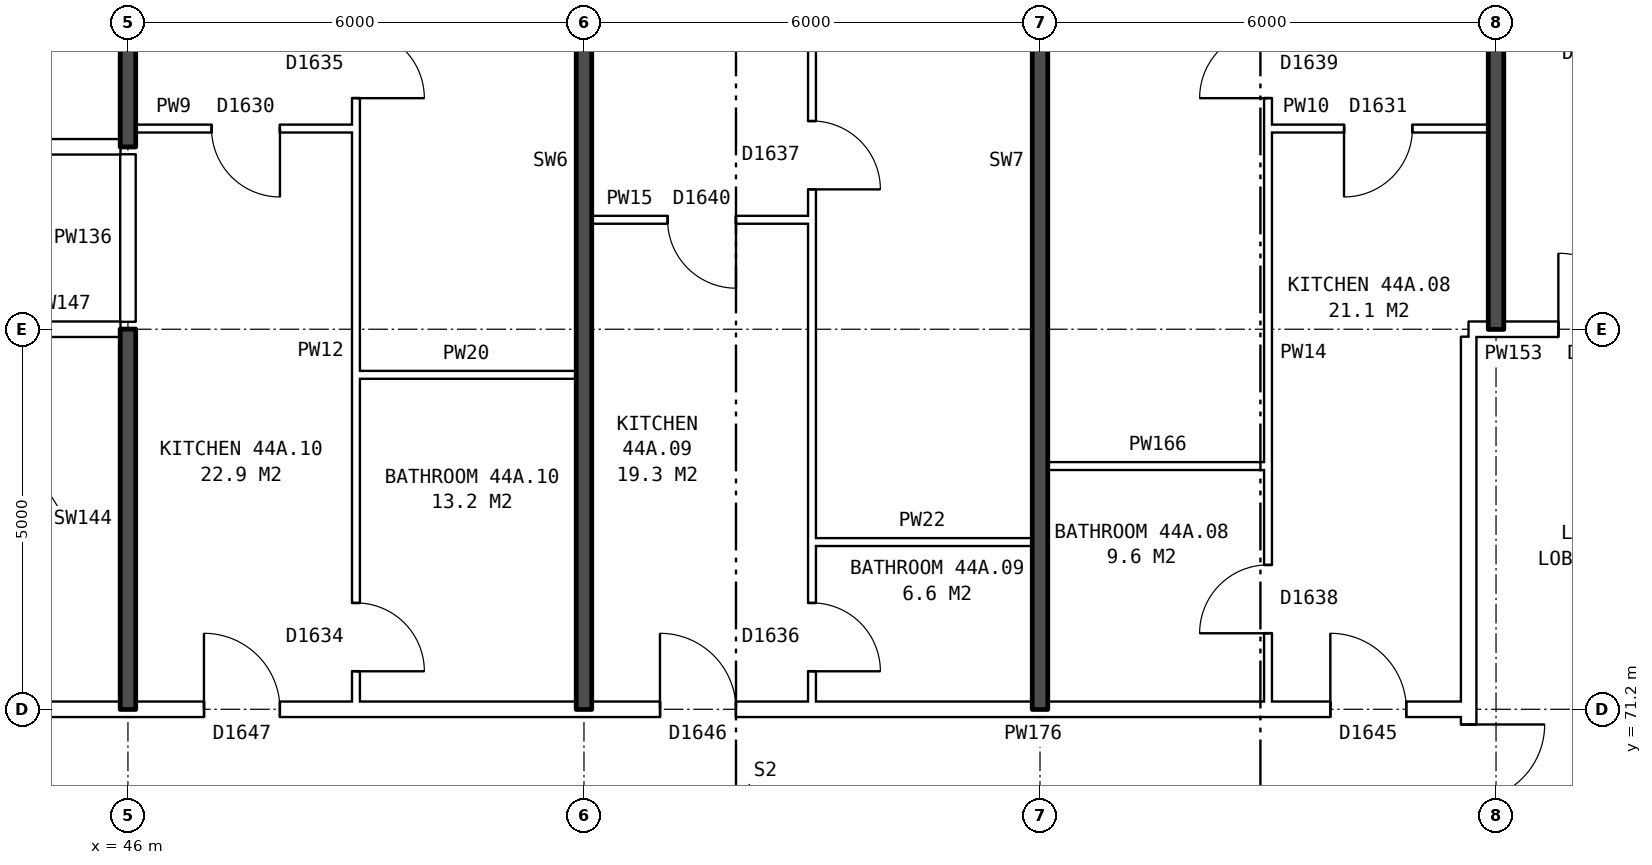
"""IFC4 building model, lengths in metres.
Left out: names, types, materials, properties, quantities, classifications, styles, units other than length and angle.
Written with IfcOpenShell. Run it as: python <this file> out.ifc"""

import sys

from ifc_helpers import new_model, si_unit, direction, frame, frame_2d, origin, place, context, subcontext, project, spatial, rectangle, extrude, element, fill, save


model = new_model("IFC4")
c1 = context("Model", 3, precision=1e-05, world=origin(), true_north=direction((0.0, 1.0)))
c2 = subcontext(c1, "Body", "Model", "MODEL_VIEW")
j1 = project(units=[si_unit("LENGTHUNIT", "METRE"), si_unit("PLANEANGLEUNIT", "RADIAN")], contexts=[c1])
p1 = place(None, origin())
s1 = spatial("IfcSite", under=j1, at=p1, CompositionType="ELEMENT")
p2 = place(p1, origin())
s2 = spatial("IfcBuilding", under=s1, at=p2, CompositionType="ELEMENT")
p3 = place(p2, frame((0.0, 0.0, 157.8)))
s3 = spatial("IfcBuildingStorey", under=s2, at=p3, CompositionType="ELEMENT", Elevation=157.8)
p4 = place(p3, frame((63.64, 63.9, 0.0), z_axis=(0.0, 0.0, 1.0), x_axis=(0.0, 1.0, 0.0)))
e1 = element("IfcWall", 1, at=p4, inside=s3, PredefinedType="PARTITIONING", context=c2, shape_type="SweptSolid", body=[
    extrude(rectangle(XDim=12.2, YDim=0.2, at=frame_2d((6.1, 0.0))), origin(), (0.0, 0.0, 1.0), 2.85),
])
p5 = place(p4, frame((5.1, 0.0, 0.0)))
e2 = element("IfcOpeningElement", 2, at=p5, cuts=e1, PredefinedType="OPENING", context=c2, shape_type="SweptSolid", body=[
    extrude(rectangle(XDim=2.0, YDim=2.1, at=frame_2d((1.0, 1.05))), frame((0.0, 0.11, 0.0), z_axis=(0.0, -1.0, 0.0), x_axis=(1.0, 0.0, 0.0)), (0.0, 0.0, 1.0), 0.22),
])
p6 = place(p3, frame((44.36, 71.2, 0.0), z_axis=(0.0, 0.0, 1.0), x_axis=(1.0, 0.0, 0.0)))
e3 = element("IfcWall", 3, at=p6, inside=s3, PredefinedType="PARTITIONING", context=c2, shape_type="SweptSolid", body=[
    extrude(rectangle(XDim=19.28, YDim=0.2, at=frame_2d((9.64, 0.0))), origin(), (0.0, 0.0, 1.0), 2.85),
])
p7 = place(p6, frame((17.46, 0.0, 0.0)))
e4 = element("IfcOpeningElement", 4, at=p7, cuts=e3, PredefinedType="OPENING", context=c2, shape_type="SweptSolid", body=[
    extrude(rectangle(XDim=1.0, YDim=2.1, at=frame_2d((0.5, 1.05))), frame((0.0, 0.11, 0.0), z_axis=(0.0, -1.0, 0.0), x_axis=(1.0, 0.0, 0.0)), (0.0, 0.0, 1.0), 0.22),
])
p8 = place(p6, frame((8.64, 0.0, 0.0)))
e5 = element("IfcOpeningElement", 5, at=p8, cuts=e3, PredefinedType="OPENING", context=c2, shape_type="SweptSolid", body=[
    extrude(rectangle(XDim=1.0, YDim=2.1, at=frame_2d((0.5, 1.05))), frame((0.0, 0.11, 0.0), z_axis=(0.0, -1.0, 0.0), x_axis=(1.0, 0.0, 0.0)), (0.0, 0.0, 1.0), 0.22),
])
p9 = place(p6, frame((2.64, 0.0, 0.0)))
e6 = element("IfcOpeningElement", 6, at=p9, cuts=e3, PredefinedType="OPENING", context=c2, shape_type="SweptSolid", body=[
    extrude(rectangle(XDim=1.0, YDim=2.1, at=frame_2d((0.5, 1.05))), frame((0.0, 0.11, 0.0), z_axis=(0.0, -1.0, 0.0), x_axis=(1.0, 0.0, 0.0)), (0.0, 0.0, 1.0), 0.22),
])
for number, where, z_axis, x_axis in (
    (7, (55.0, 73.4, 0.0), (0.0, 0.0, 1.0), (1.0, 0.0, 0.0)),
    (8, (58.1, 74.4, 0.0), (0.0, 0.0, 1.0), (1.0, 0.0, 0.0)),
    (9, (49.0, 75.6, 0.0), (0.0, 0.0, 1.0), (1.0, 0.0, 0.0)),
):
    element("IfcWall", number, at=place(p3, frame(where, z_axis=z_axis, x_axis=x_axis)), inside=s3, PredefinedType="PARTITIONING", context=c2, shape_type="SweptSolid", body=[
        extrude(rectangle(XDim=2.9, YDim=0.1, at=frame_2d((1.45, 0.0))), origin(), (0.0, 0.0, 1.0), 2.85),
    ])
p10 = place(p3, frame((44.36, 76.2, 0.0), z_axis=(0.0, 0.0, 1.0), x_axis=(1.0, 0.0, 0.0)))
e10 = element("IfcWall", 10, at=p10, inside=s3, PredefinedType="PARTITIONING", context=c2, shape_type="SweptSolid", body=[
    extrude(rectangle(XDim=1.54, YDim=0.2, at=frame_2d((0.77, 0.0))), origin(), (0.0, 0.0, 1.0), 2.85),
])
p11 = place(p3, frame((63.64, 76.2, 0.0), z_axis=(0.0, 0.0, 1.0), x_axis=(1.0, 0.0, 0.0)))
e11 = element("IfcWall", 11, at=p11, inside=s3, PredefinedType="PARTITIONING", context=c2, shape_type="SweptSolid", body=[
    extrude(rectangle(XDim=3.0, YDim=0.2, at=frame_2d((1.5, 0.0))), origin(), (0.0, 0.0, 1.0), 2.85),
])
p12 = place(p11, frame((1.18, 0.0, 0.0)))
e12 = element("IfcOpeningElement", 12, at=p12, cuts=e11, PredefinedType="OPENING", context=c2, shape_type="SweptSolid", body=[
    extrude(rectangle(XDim=1.0, YDim=2.1, at=frame_2d((0.5, 1.05))), frame((0.0, 0.11, 0.0), z_axis=(0.0, -1.0, 0.0), x_axis=(1.0, 0.0, 0.0)), (0.0, 0.0, 1.0), 0.22),
])
p13 = place(p3, frame((52.1, 77.64, 0.0), z_axis=(0.0, 0.0, 1.0), x_axis=(1.0, 0.0, 0.0)))
e13 = element("IfcWall", 13, at=p13, inside=s3, PredefinedType="PARTITIONING", context=c2, shape_type="SweptSolid", body=[
    extrude(rectangle(XDim=2.9, YDim=0.1, at=frame_2d((1.45, 0.0))), origin(), (0.0, 0.0, 1.0), 2.85),
])
p14 = place(p13, frame((1.0, 0.0, 0.0)))
e14 = element("IfcOpeningElement", 14, at=p14, cuts=e13, PredefinedType="OPENING", context=c2, shape_type="SweptSolid", body=[
    extrude(rectangle(XDim=0.9, YDim=2.1, at=frame_2d((0.45, 1.05))), frame((0.0, 0.06, 0.0), z_axis=(0.0, -1.0, 0.0), x_axis=(1.0, 0.0, 0.0)), (0.0, 0.0, 1.0), 0.12),
])
p15 = place(p3, frame((28.86, 78.6, 0.0), z_axis=(0.0, 0.0, 1.0), x_axis=(1.0, 0.0, 0.0)))
e15 = element("IfcWall", 15, at=p15, inside=s3, PredefinedType="PARTITIONING", context=c2, shape_type="SweptSolid", body=[
    extrude(rectangle(XDim=17.04, YDim=0.2, at=frame_2d((8.52, 0.0))), origin(), (0.0, 0.0, 1.0), 2.85),
])
p16 = place(p15, frame((14.59, 0.0, 0.0)))
e16 = element("IfcOpeningElement", 16, at=p16, cuts=e15, PredefinedType="OPENING", context=c2, shape_type="SweptSolid", body=[
    extrude(rectangle(XDim=1.0, YDim=2.1, at=frame_2d((0.5, 1.05))), frame((0.0, 0.11, 0.0), z_axis=(0.0, -1.0, 0.0), x_axis=(1.0, 0.0, 0.0)), (0.0, 0.0, 1.0), 0.22),
])
p17 = place(p15, frame((7.64, 0.0, 0.0)))
e17 = element("IfcOpeningElement", 17, at=p17, cuts=e15, PredefinedType="OPENING", context=c2, shape_type="SweptSolid", body=[
    extrude(rectangle(XDim=1.0, YDim=2.1, at=frame_2d((0.5, 1.05))), frame((0.0, 0.11, 0.0), z_axis=(0.0, -1.0, 0.0), x_axis=(1.0, 0.0, 0.0)), (0.0, 0.0, 1.0), 0.22),
])
p18 = place(p3, frame((46.1, 78.84, 0.0), z_axis=(0.0, 0.0, 1.0), x_axis=(1.0, 0.0, 0.0)))
e18 = element("IfcWall", 18, at=p18, inside=s3, PredefinedType="PARTITIONING", context=c2, shape_type="SweptSolid", body=[
    extrude(rectangle(XDim=2.9, YDim=0.1, at=frame_2d((1.45, 0.0))), origin(), (0.0, 0.0, 1.0), 2.85),
])
p19 = place(p18, frame((1.0, 0.0, 0.0)))
e19 = element("IfcOpeningElement", 19, at=p19, cuts=e18, PredefinedType="OPENING", context=c2, shape_type="SweptSolid", body=[
    extrude(rectangle(XDim=0.9, YDim=2.1, at=frame_2d((0.45, 1.05))), frame((0.0, 0.06, 0.0), z_axis=(0.0, -1.0, 0.0), x_axis=(1.0, 0.0, 0.0)), (0.0, 0.0, 1.0), 0.12),
])
p20 = place(p3, frame((61.0, 78.84, 0.0), z_axis=(0.0, 0.0, 1.0), x_axis=(1.0, 0.0, 0.0)))
e20 = element("IfcWall", 20, at=p20, inside=s3, PredefinedType="PARTITIONING", context=c2, shape_type="SweptSolid", body=[
    extrude(rectangle(XDim=2.9, YDim=0.1, at=frame_2d((1.45, 0.0))), origin(), (0.0, 0.0, 1.0), 2.85),
])
p21 = place(p20, frame((1.0, 0.0, 0.0)))
e21 = element("IfcOpeningElement", 21, at=p21, cuts=e20, PredefinedType="OPENING", context=c2, shape_type="SweptSolid", body=[
    extrude(rectangle(XDim=0.9, YDim=2.1, at=frame_2d((0.45, 1.05))), frame((0.0, 0.06, 0.0), z_axis=(0.0, -1.0, 0.0), x_axis=(1.0, 0.0, 0.0)), (0.0, 0.0, 1.0), 0.12),
])
p22 = place(p3, frame((46.0, 71.2, 0.0), z_axis=(0.0, 0.0, 1.0), x_axis=(0.0, 1.0, 0.0)))
e22 = element("IfcWall", 22, at=p22, inside=s3, PredefinedType="SOLIDWALL", context=c2, shape_type="SweptSolid", body=[
    extrude(rectangle(XDim=5.0, YDim=0.2, at=frame_2d((2.5, 0.0))), origin(), (0.0, 0.0, 1.0), 2.85),
])
p23 = place(p3, frame((46.0, 76.3, 0.0), z_axis=(0.0, 0.0, 1.0), x_axis=(0.0, 1.0, 0.0)))
e23 = element("IfcWall", 23, at=p23, inside=s3, PredefinedType="PARTITIONING", context=c2, shape_type="SweptSolid", body=[
    extrude(rectangle(XDim=2.2, YDim=0.2, at=frame_2d((1.1, 0.0))), origin(), (0.0, 0.0, 1.0), 2.85),
])
p24 = place(p3, frame((46.0, 78.6, 0.0), z_axis=(0.0, 0.0, 1.0), x_axis=(0.0, 1.0, 0.0)))
e24 = element("IfcWall", 24, at=p24, inside=s3, PredefinedType="SOLIDWALL", context=c2, shape_type="SweptSolid", body=[
    extrude(rectangle(XDim=7.04, YDim=0.2, at=frame_2d((3.52, 0.0))), origin(), (0.0, 0.0, 1.0), 2.85),
])
p25 = place(p3, frame((49.0, 71.3, 0.0), z_axis=(0.0, 0.0, 1.0), x_axis=(0.0, 1.0, 0.0)))
e25 = element("IfcWall", 25, at=p25, inside=s3, PredefinedType="PARTITIONING", context=c2, shape_type="SweptSolid", body=[
    extrude(rectangle(XDim=14.34, YDim=0.1, at=frame_2d((7.17, 0.0))), origin(), (0.0, 0.0, 1.0), 2.85),
])
p26 = place(p25, frame((7.94, 0.0, 0.0)))
e26 = element("IfcOpeningElement", 26, at=p26, cuts=e25, PredefinedType="OPENING", context=c2, shape_type="SweptSolid", body=[
    extrude(rectangle(XDim=0.9, YDim=2.1, at=frame_2d((0.45, 1.05))), frame((0.0, 0.06, 0.0), z_axis=(0.0, -1.0, 0.0), x_axis=(1.0, 0.0, 0.0)), (0.0, 0.0, 1.0), 0.12),
])
p27 = place(p25, frame((0.4, 0.0, 0.0)))
e27 = element("IfcOpeningElement", 27, at=p27, cuts=e25, PredefinedType="OPENING", context=c2, shape_type="SweptSolid", body=[
    extrude(rectangle(XDim=0.9, YDim=2.1, at=frame_2d((0.45, 1.05))), frame((0.0, 0.06, 0.0), z_axis=(0.0, -1.0, 0.0), x_axis=(1.0, 0.0, 0.0)), (0.0, 0.0, 1.0), 0.12),
])
p28 = place(p3, frame((52.0, 71.2, 0.0), z_axis=(0.0, 0.0, 1.0), x_axis=(0.0, 1.0, 0.0)))
e28 = element("IfcWall", 28, at=p28, inside=s3, PredefinedType="SOLIDWALL", context=c2, shape_type="SweptSolid", body=[
    extrude(rectangle(XDim=14.44, YDim=0.2, at=frame_2d((7.22, 0.0))), origin(), (0.0, 0.0, 1.0), 2.85),
])
p29 = place(p3, frame((55.0, 71.3, 0.0), z_axis=(0.0, 0.0, 1.0), x_axis=(0.0, 1.0, 0.0)))
e29 = element("IfcWall", 29, at=p29, inside=s3, PredefinedType="PARTITIONING", context=c2, shape_type="SweptSolid", body=[
    extrude(rectangle(XDim=14.34, YDim=0.1, at=frame_2d((7.17, 0.0))), origin(), (0.0, 0.0, 1.0), 2.85),
])
p30 = place(p29, frame((6.74, 0.0, 0.0)))
e30 = element("IfcOpeningElement", 30, at=p30, cuts=e29, PredefinedType="OPENING", context=c2, shape_type="SweptSolid", body=[
    extrude(rectangle(XDim=0.9, YDim=2.1, at=frame_2d((0.45, 1.05))), frame((0.0, 0.06, 0.0), z_axis=(0.0, -1.0, 0.0), x_axis=(1.0, 0.0, 0.0)), (0.0, 0.0, 1.0), 0.12),
])
p31 = place(p29, frame((0.4, 0.0, 0.0)))
e31 = element("IfcOpeningElement", 31, at=p31, cuts=e29, PredefinedType="OPENING", context=c2, shape_type="SweptSolid", body=[
    extrude(rectangle(XDim=0.9, YDim=2.1, at=frame_2d((0.45, 1.05))), frame((0.0, 0.06, 0.0), z_axis=(0.0, -1.0, 0.0), x_axis=(1.0, 0.0, 0.0)), (0.0, 0.0, 1.0), 0.12),
])
p32 = place(p3, frame((58.0, 71.2, 0.0), z_axis=(0.0, 0.0, 1.0), x_axis=(0.0, 1.0, 0.0)))
e32 = element("IfcWall", 32, at=p32, inside=s3, PredefinedType="SOLIDWALL", context=c2, shape_type="SweptSolid", body=[
    extrude(rectangle(XDim=14.44, YDim=0.2, at=frame_2d((7.22, 0.0))), origin(), (0.0, 0.0, 1.0), 2.85),
])
p33 = place(p3, frame((61.0, 71.3, 0.0), z_axis=(0.0, 0.0, 1.0), x_axis=(0.0, 1.0, 0.0)))
e33 = element("IfcWall", 33, at=p33, inside=s3, PredefinedType="PARTITIONING", context=c2, shape_type="SweptSolid", body=[
    extrude(rectangle(XDim=14.34, YDim=0.1, at=frame_2d((7.17, 0.0))), origin(), (0.0, 0.0, 1.0), 2.85),
])
p34 = place(p33, frame((7.94, 0.0, 0.0)))
e34 = element("IfcOpeningElement", 34, at=p34, cuts=e33, PredefinedType="OPENING", context=c2, shape_type="SweptSolid", body=[
    extrude(rectangle(XDim=0.9, YDim=2.1, at=frame_2d((0.45, 1.05))), frame((0.0, 0.06, 0.0), z_axis=(0.0, -1.0, 0.0), x_axis=(1.0, 0.0, 0.0)), (0.0, 0.0, 1.0), 0.12),
])
p35 = place(p33, frame((0.9, 0.0, 0.0)))
e35 = element("IfcOpeningElement", 35, at=p35, cuts=e33, PredefinedType="OPENING", context=c2, shape_type="SweptSolid", body=[
    extrude(rectangle(XDim=0.9, YDim=2.1, at=frame_2d((0.45, 1.05))), frame((0.0, 0.06, 0.0), z_axis=(0.0, -1.0, 0.0), x_axis=(1.0, 0.0, 0.0)), (0.0, 0.0, 1.0), 0.12),
])
p36 = place(p3, frame((64.0, 76.2, 0.0), z_axis=(0.0, 0.0, 1.0), x_axis=(0.0, 1.0, 0.0)))
e36 = element("IfcWall", 36, at=p36, inside=s3, PredefinedType="SOLIDWALL", context=c2, shape_type="SweptSolid", body=[
    extrude(rectangle(XDim=9.44, YDim=0.2, at=frame_2d((4.72, 0.0))), origin(), (0.0, 0.0, 1.0), 2.85),
])
p37 = place(p5, frame((2.0, 0.0, 0.0), z_axis=(0.0, 0.0, 1.0), x_axis=(-1.0, 0.0, 0.0)))
e37 = element("IfcDoor", 37, at=p37, inside=s3, OperationType="DOUBLE_DOOR_SINGLE_SWING", PredefinedType="DOOR", context=c2, shape_type="SweptSolid", body=[
    extrude(rectangle(XDim=2.0, YDim=2.1, at=frame_2d((1.0, 1.05))), frame((0.0, 0.025, 0.0), z_axis=(0.0, -1.0, 0.0), x_axis=(1.0, 0.0, 0.0)), (0.0, 0.0, 1.0), 0.05),
])
fill(e2, e37)
p38 = place(p12, origin())
e38 = element("IfcDoor", 38, at=p38, inside=s3, OperationType="SINGLE_SWING_LEFT", PredefinedType="DOOR", context=c2, shape_type="SweptSolid", body=[
    extrude(rectangle(XDim=1.0, YDim=2.1, at=frame_2d((0.5, 1.05))), frame((0.0, 0.025, 0.0), z_axis=(0.0, -1.0, 0.0), x_axis=(1.0, 0.0, 0.0)), (0.0, 0.0, 1.0), 0.05),
])
fill(e12, e38)
p39 = place(p34, origin())
e39 = element("IfcDoor", 39, at=p39, inside=s3, OperationType="SINGLE_SWING_LEFT", PredefinedType="DOOR", context=c2, shape_type="SweptSolid", body=[
    extrude(rectangle(XDim=0.9, YDim=2.1, at=frame_2d((0.45, 1.05))), frame((0.0, 0.025, 0.0), z_axis=(0.0, -1.0, 0.0), x_axis=(1.0, 0.0, 0.0)), (0.0, 0.0, 1.0), 0.05),
])
fill(e34, e39)
p40 = place(p7, origin())
e40 = element("IfcDoor", 40, at=p40, inside=s3, OperationType="SINGLE_SWING_LEFT", PredefinedType="DOOR", context=c2, shape_type="SweptSolid", body=[
    extrude(rectangle(XDim=1.0, YDim=2.1, at=frame_2d((0.5, 1.05))), frame((0.0, 0.025, 0.0), z_axis=(0.0, -1.0, 0.0), x_axis=(1.0, 0.0, 0.0)), (0.0, 0.0, 1.0), 0.05),
])
fill(e4, e40)
p41 = place(p21, frame((0.9, 0.0, 0.0), z_axis=(0.0, 0.0, 1.0), x_axis=(-1.0, 0.0, 0.0)))
e41 = element("IfcDoor", 41, at=p41, inside=s3, OperationType="SINGLE_SWING_RIGHT", PredefinedType="DOOR", context=c2, shape_type="SweptSolid", body=[
    extrude(rectangle(XDim=0.9, YDim=2.1, at=frame_2d((0.45, 1.05))), frame((0.0, 0.025, 0.0), z_axis=(0.0, -1.0, 0.0), x_axis=(1.0, 0.0, 0.0)), (0.0, 0.0, 1.0), 0.05),
])
fill(e21, e41)
p42 = place(p35, origin())
e42 = element("IfcDoor", 42, at=p42, inside=s3, OperationType="SINGLE_SWING_LEFT", PredefinedType="DOOR", context=c2, shape_type="SweptSolid", body=[
    extrude(rectangle(XDim=0.9, YDim=2.1, at=frame_2d((0.45, 1.05))), frame((0.0, 0.025, 0.0), z_axis=(0.0, -1.0, 0.0), x_axis=(1.0, 0.0, 0.0)), (0.0, 0.0, 1.0), 0.05),
])
fill(e35, e42)
p43 = place(p30, frame((0.9, 0.0, 0.0), z_axis=(0.0, 0.0, 1.0), x_axis=(-1.0, 0.0, 0.0)))
e43 = element("IfcDoor", 43, at=p43, inside=s3, OperationType="SINGLE_SWING_RIGHT", PredefinedType="DOOR", context=c2, shape_type="SweptSolid", body=[
    extrude(rectangle(XDim=0.9, YDim=2.1, at=frame_2d((0.45, 1.05))), frame((0.0, 0.025, 0.0), z_axis=(0.0, -1.0, 0.0), x_axis=(1.0, 0.0, 0.0)), (0.0, 0.0, 1.0), 0.05),
])
fill(e30, e43)
p44 = place(p8, origin())
e44 = element("IfcDoor", 44, at=p44, inside=s3, OperationType="SINGLE_SWING_LEFT", PredefinedType="DOOR", context=c2, shape_type="SweptSolid", body=[
    extrude(rectangle(XDim=1.0, YDim=2.1, at=frame_2d((0.5, 1.05))), frame((0.0, 0.025, 0.0), z_axis=(0.0, -1.0, 0.0), x_axis=(1.0, 0.0, 0.0)), (0.0, 0.0, 1.0), 0.05),
])
fill(e5, e44)
p45 = place(p14, frame((0.9, 0.0, 0.0), z_axis=(0.0, 0.0, 1.0), x_axis=(-1.0, 0.0, 0.0)))
e45 = element("IfcDoor", 45, at=p45, inside=s3, OperationType="SINGLE_SWING_LEFT", PredefinedType="DOOR", context=c2, shape_type="SweptSolid", body=[
    extrude(rectangle(XDim=0.9, YDim=2.1, at=frame_2d((0.45, 1.05))), frame((0.0, 0.025, 0.0), z_axis=(0.0, -1.0, 0.0), x_axis=(1.0, 0.0, 0.0)), (0.0, 0.0, 1.0), 0.05),
])
fill(e14, e45)
p46 = place(p31, frame((0.9, 0.0, 0.0), z_axis=(0.0, 0.0, 1.0), x_axis=(-1.0, 0.0, 0.0)))
e46 = element("IfcDoor", 46, at=p46, inside=s3, OperationType="SINGLE_SWING_RIGHT", PredefinedType="DOOR", context=c2, shape_type="SweptSolid", body=[
    extrude(rectangle(XDim=0.9, YDim=2.1, at=frame_2d((0.45, 1.05))), frame((0.0, 0.025, 0.0), z_axis=(0.0, -1.0, 0.0), x_axis=(1.0, 0.0, 0.0)), (0.0, 0.0, 1.0), 0.05),
])
fill(e31, e46)
p47 = place(p26, frame((0.9, 0.0, 0.0), z_axis=(0.0, 0.0, 1.0), x_axis=(-1.0, 0.0, 0.0)))
e47 = element("IfcDoor", 47, at=p47, inside=s3, OperationType="SINGLE_SWING_RIGHT", PredefinedType="DOOR", context=c2, shape_type="SweptSolid", body=[
    extrude(rectangle(XDim=0.9, YDim=2.1, at=frame_2d((0.45, 1.05))), frame((0.0, 0.025, 0.0), z_axis=(0.0, -1.0, 0.0), x_axis=(1.0, 0.0, 0.0)), (0.0, 0.0, 1.0), 0.05),
])
fill(e26, e47)
p48 = place(p9, origin())
e48 = element("IfcDoor", 48, at=p48, inside=s3, OperationType="SINGLE_SWING_LEFT", PredefinedType="DOOR", context=c2, shape_type="SweptSolid", body=[
    extrude(rectangle(XDim=1.0, YDim=2.1, at=frame_2d((0.5, 1.05))), frame((0.0, 0.025, 0.0), z_axis=(0.0, -1.0, 0.0), x_axis=(1.0, 0.0, 0.0)), (0.0, 0.0, 1.0), 0.05),
])
fill(e6, e48)
p49 = place(p19, frame((0.9, 0.0, 0.0), z_axis=(0.0, 0.0, 1.0), x_axis=(-1.0, 0.0, 0.0)))
e49 = element("IfcDoor", 49, at=p49, inside=s3, OperationType="SINGLE_SWING_LEFT", PredefinedType="DOOR", context=c2, shape_type="SweptSolid", body=[
    extrude(rectangle(XDim=0.9, YDim=2.1, at=frame_2d((0.45, 1.05))), frame((0.0, 0.025, 0.0), z_axis=(0.0, -1.0, 0.0), x_axis=(1.0, 0.0, 0.0)), (0.0, 0.0, 1.0), 0.05),
])
fill(e19, e49)
p50 = place(p27, frame((0.9, 0.0, 0.0), z_axis=(0.0, 0.0, 1.0), x_axis=(-1.0, 0.0, 0.0)))
e50 = element("IfcDoor", 50, at=p50, inside=s3, OperationType="SINGLE_SWING_RIGHT", PredefinedType="DOOR", context=c2, shape_type="SweptSolid", body=[
    extrude(rectangle(XDim=0.9, YDim=2.1, at=frame_2d((0.45, 1.05))), frame((0.0, 0.025, 0.0), z_axis=(0.0, -1.0, 0.0), x_axis=(1.0, 0.0, 0.0)), (0.0, 0.0, 1.0), 0.05),
])
fill(e27, e50)
save(model, sys.argv[1])
